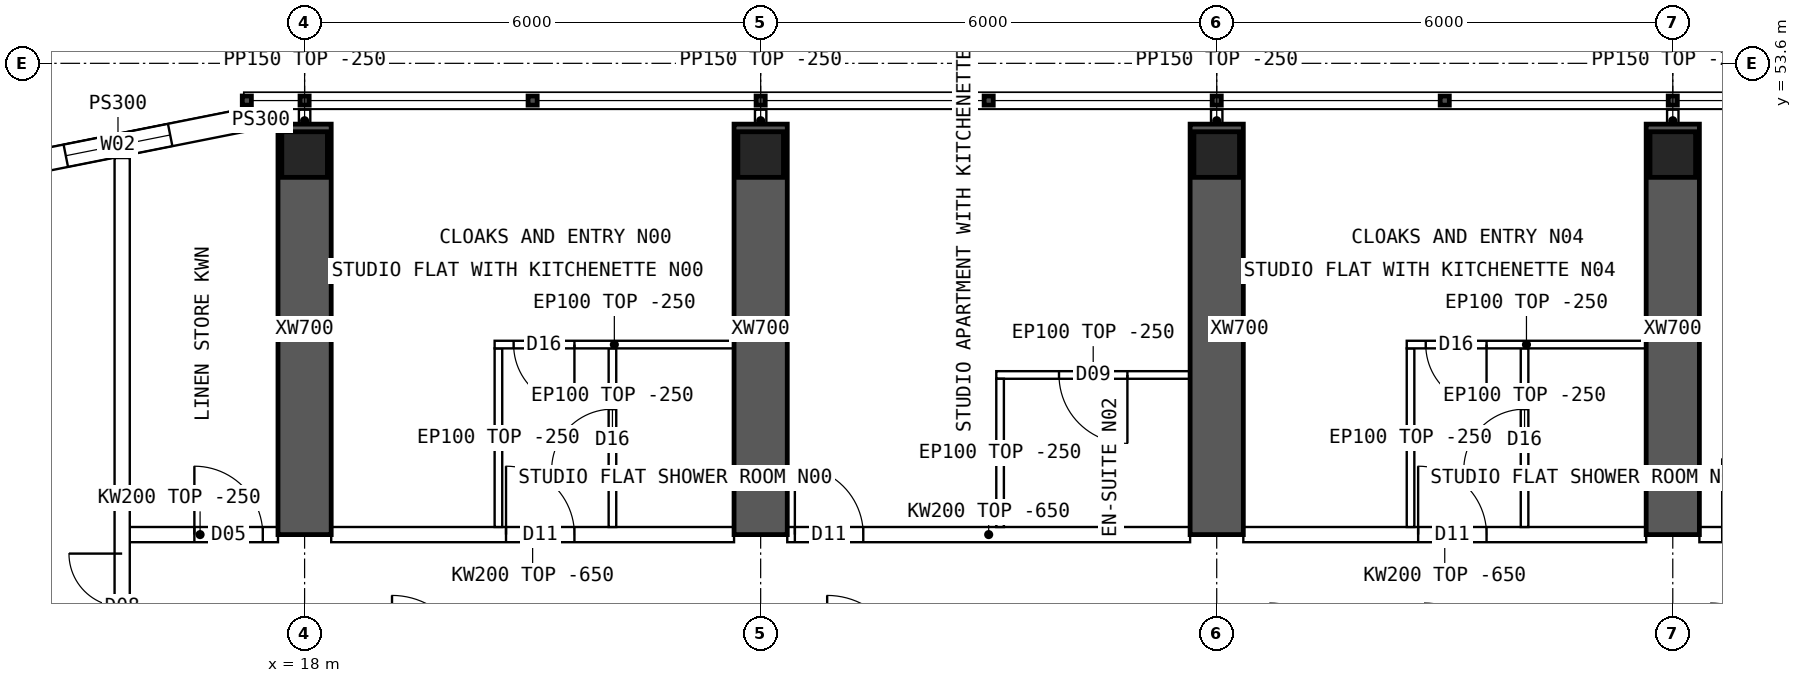
"""IFC4 building model, lengths in metres.
Left out: names, types, materials, properties, quantities, classifications, styles, units other than length and angle.
Written with IfcOpenShell. Run it as: python <this file> out.ifc"""

import sys

from ifc_helpers import new_model, si_unit, direction, frame, frame_2d, origin, origin_2d, place, context, subcontext, project, spatial, polyline, rectangle, hollow_rectangle, outline, extrude, element, fill, save


model = new_model("IFC4")
c1 = context("Model", 3, precision=1e-05, world=origin(), true_north=direction((0.0, 1.0)))
c2 = subcontext(c1, "Body", "Model", "MODEL_VIEW")
j1 = project(units=[si_unit("LENGTHUNIT", "METRE"), si_unit("PLANEANGLEUNIT", "RADIAN")], contexts=[c1])
p1 = place(None, origin())
s1 = spatial("IfcSite", under=j1, at=p1, CompositionType="ELEMENT")
p2 = place(p1, origin())
s2 = spatial("IfcBuilding", under=s1, at=p2, CompositionType="ELEMENT")
p3 = place(p2, frame((0.0, 0.0, 224.05)))
s3 = spatial("IfcBuildingStorey", under=s2, at=p3, CompositionType="ELEMENT", Elevation=224.05)
for number, where, z_axis, x_axis in (
    (1, (18.0, 52.4, 0.0), (0.0, 0.0, 1.0), (1.0, 0.0, 0.0)),
    (2, (24.0, 52.4, 0.0), (0.0, 0.0, 1.0), (1.0, 0.0, 0.0)),
    (3, (30.0, 52.4, 0.0), (0.0, 0.0, 1.0), (1.0, 0.0, 0.0)),
    (4, (36.0, 52.4, 0.0), (0.0, 0.0, 1.0), (1.0, 0.0, 0.0)),
):
    element("IfcColumn", number, at=place(p3, frame(where, z_axis=z_axis, x_axis=x_axis)), inside=s3, PredefinedType="COLUMN", context=c2, shape_type="SweptSolid", body=[
        extrude(hollow_rectangle(XDim=0.6, YDim=0.6, WallThickness=0.06, at=origin_2d()), origin(), (0.0, 0.0, 1.0), 3.75),
    ])
for number, where, z_axis, x_axis in (
    (5, (18.0, 47.4, 0.0), (0.0, 0.0, 1.0), (0.0, 1.0, 0.0)),
    (6, (24.0, 47.4, 0.0), (0.0, 0.0, 1.0), (0.0, 1.0, 0.0)),
    (7, (30.0, 47.4, 0.0), (0.0, 0.0, 1.0), (0.0, 1.0, 0.0)),
    (8, (36.0, 47.4, 0.0), (0.0, 0.0, 1.0), (0.0, 1.0, 0.0)),
):
    element("IfcWall", number, at=place(p3, frame(where, z_axis=z_axis, x_axis=x_axis)), inside=s3, PredefinedType="SHEAR", context=c2, shape_type="SweptSolid", body=[
        extrude(rectangle(XDim=5.4, YDim=0.7, at=frame_2d((2.7, 0.0))), origin(), (0.0, 0.0, 1.0), 3.75),
    ])
p4 = place(p3, frame((17.2, 52.85, 0.0), z_axis=(0.0, 0.0, 1.0), x_axis=(-0.98078325777, -0.195100490205, 0.0)))
e9 = element("IfcWall", 9, at=p4, inside=s3, PredefinedType="SOLIDWALL", context=c2, shape_type="SweptSolid", body=[
    extrude(outline(polyline([(-0.03, -0.15), (3.405, -0.15), (3.345, 0.15), (0.03, 0.15), (-0.03, -0.15)])), origin(), (0.0, 0.0, 1.0), 3.5),
])
p5 = place(p4, frame((0.988, 0.0, 0.9)))
e10 = element("IfcOpeningElement", 10, at=p5, cuts=e9, PredefinedType="OPENING", context=c2, shape_type="SweptSolid", body=[
    extrude(rectangle(XDim=1.4, YDim=1.8, at=frame_2d((0.7, 0.9))), frame((0.0, 0.16, 0.0), z_axis=(0.0, -1.0, 0.0), x_axis=(1.0, 0.0, 0.0)), (0.0, 0.0, 1.0), 0.32),
])
p6 = place(p3, frame((17.2, 52.85, 0.0), z_axis=(0.0, 0.0, 1.0), x_axis=(1.0, 0.0, 0.0)))
e11 = element("IfcWall", 11, at=p6, inside=s3, PredefinedType="SOLIDWALL", context=c2, shape_type="SweptSolid", body=[
    extrude(rectangle(XDim=0.45, YDim=0.3, at=frame_2d((0.225, 0.0))), origin(), (0.0, 0.0, 1.0), 3.5),
])
p7 = place(p3, frame((15.6, 47.4, 0.0), z_axis=(0.0, 0.0, 1.0), x_axis=(1.0, 0.0, 0.0)))
e12 = element("IfcWall", 12, at=p7, inside=s3, PredefinedType="SOLIDWALL", context=c2, shape_type="SweptSolid", body=[
    extrude(rectangle(XDim=2.05, YDim=0.2, at=frame_2d((1.025, 0.0))), origin(), (0.0, 0.0, 1.0), 3.5),
])
p8 = place(p7, frame((0.95, 0.0, 0.0)))
e13 = element("IfcOpeningElement", 13, at=p8, cuts=e12, PredefinedType="OPENING", context=c2, shape_type="SweptSolid", body=[
    extrude(rectangle(XDim=0.9, YDim=2.1, at=frame_2d((0.45, 1.05))), frame((0.0, 0.11, 0.0), z_axis=(0.0, -1.0, 0.0), x_axis=(1.0, 0.0, 0.0)), (0.0, 0.0, 1.0), 0.22),
])
p9 = place(p3, frame((18.35, 47.4, 0.0), z_axis=(0.0, 0.0, 1.0), x_axis=(1.0, 0.0, 0.0)))
e14 = element("IfcWall", 14, at=p9, inside=s3, PredefinedType="SOLIDWALL", context=c2, shape_type="SweptSolid", body=[
    extrude(outline(polyline([(0.0, 0.0), (5.3, 0.0), (5.3, 3.1), (0.0, 3.1), (0.0, 0.0)])), frame((0.0, 0.1, 0.0), z_axis=(0.0, -1.0, 0.0), x_axis=(1.0, 0.0, 0.0)), (0.0, 0.0, 1.0), 0.2),
])
p10 = place(p9, frame((2.3, 0.0, 0.0)))
e15 = element("IfcOpeningElement", 15, at=p10, cuts=e14, PredefinedType="OPENING", context=c2, shape_type="SweptSolid", body=[
    extrude(rectangle(XDim=0.9, YDim=2.1, at=frame_2d((0.45, 1.05))), frame((0.0, 0.11, 0.0), z_axis=(0.0, -1.0, 0.0), x_axis=(1.0, 0.0, 0.0)), (0.0, 0.0, 1.0), 0.22),
])
p11 = place(p3, frame((24.35, 47.4, 0.0), z_axis=(0.0, 0.0, 1.0), x_axis=(1.0, 0.0, 0.0)))
e16 = element("IfcWall", 16, at=p11, inside=s3, PredefinedType="SOLIDWALL", context=c2, shape_type="SweptSolid", body=[
    extrude(outline(polyline([(0.0, 0.0), (5.3, 0.0), (5.3, 3.1), (0.0, 3.1), (0.0, 0.0)])), frame((0.0, 0.1, 0.0), z_axis=(0.0, -1.0, 0.0), x_axis=(1.0, 0.0, 0.0)), (0.0, 0.0, 1.0), 0.2),
])
p12 = place(p11, frame((0.1, 0.0, 0.0)))
e17 = element("IfcOpeningElement", 17, at=p12, cuts=e16, PredefinedType="OPENING", context=c2, shape_type="SweptSolid", body=[
    extrude(rectangle(XDim=0.9, YDim=2.1, at=frame_2d((0.45, 1.05))), frame((0.0, 0.11, 0.0), z_axis=(0.0, -1.0, 0.0), x_axis=(1.0, 0.0, 0.0)), (0.0, 0.0, 1.0), 0.22),
])
p13 = place(p3, frame((30.35, 47.4, 0.0), z_axis=(0.0, 0.0, 1.0), x_axis=(1.0, 0.0, 0.0)))
e18 = element("IfcWall", 18, at=p13, inside=s3, PredefinedType="SOLIDWALL", context=c2, shape_type="SweptSolid", body=[
    extrude(outline(polyline([(0.0, 0.0), (5.3, 0.0), (5.3, 3.1), (0.0, 3.1), (0.0, 0.0)])), frame((0.0, 0.1, 0.0), z_axis=(0.0, -1.0, 0.0), x_axis=(1.0, 0.0, 0.0)), (0.0, 0.0, 1.0), 0.2),
])
p14 = place(p13, frame((2.3, 0.0, 0.0)))
e19 = element("IfcOpeningElement", 19, at=p14, cuts=e18, PredefinedType="OPENING", context=c2, shape_type="SweptSolid", body=[
    extrude(rectangle(XDim=0.9, YDim=2.1, at=frame_2d((0.45, 1.05))), frame((0.0, 0.11, 0.0), z_axis=(0.0, -1.0, 0.0), x_axis=(1.0, 0.0, 0.0)), (0.0, 0.0, 1.0), 0.22),
])
p15 = place(p3, frame((36.35, 47.4, 0.0), z_axis=(0.0, 0.0, 1.0), x_axis=(1.0, 0.0, 0.0)))
e20 = element("IfcWall", 20, at=p15, inside=s3, PredefinedType="SOLIDWALL", context=c2, shape_type="SweptSolid", body=[
    extrude(outline(polyline([(0.0, 0.0), (5.3, 0.0), (5.3, 3.1), (0.0, 3.1), (0.0, 0.0)])), frame((0.0, 0.1, 0.0), z_axis=(0.0, -1.0, 0.0), x_axis=(1.0, 0.0, 0.0)), (0.0, 0.0, 1.0), 0.2),
])
p16 = place(p15, frame((0.3, 0.0, 0.0)))
e21 = element("IfcOpeningElement", 21, at=p16, cuts=e20, PredefinedType="OPENING", context=c2, shape_type="SweptSolid", body=[
    extrude(rectangle(XDim=1.0, YDim=2.1, at=frame_2d((0.5, 1.05))), frame((0.0, 0.11, 0.0), z_axis=(0.0, -1.0, 0.0), x_axis=(1.0, 0.0, 0.0)), (0.0, 0.0, 1.0), 0.22),
])
p17 = place(p3, frame((20.5, 49.9, 0.0), z_axis=(0.0, 0.0, 1.0), x_axis=(1.0, 0.0, 0.0)))
e22 = element("IfcWall", 22, at=p17, inside=s3, PredefinedType="PARTITIONING", context=c2, shape_type="SweptSolid", body=[
    extrude(rectangle(XDim=3.15, YDim=0.1, at=frame_2d((1.575, 0.0))), origin(), (0.0, 0.0, 1.0), 3.5),
])
p18 = place(p17, frame((0.25, 0.0, 0.0)))
e23 = element("IfcOpeningElement", 23, at=p18, cuts=e22, PredefinedType="OPENING", context=c2, shape_type="SweptSolid", body=[
    extrude(rectangle(XDim=0.8, YDim=2.1, at=frame_2d((0.4, 1.05))), frame((0.0, 0.06, 0.0), z_axis=(0.0, -1.0, 0.0), x_axis=(1.0, 0.0, 0.0)), (0.0, 0.0, 1.0), 0.12),
])
p19 = place(p3, frame((20.55, 49.85, 0.0), z_axis=(0.0, 0.0, 1.0), x_axis=(0.0, -1.0, 0.0)))
e24 = element("IfcWall", 24, at=p19, inside=s3, PredefinedType="PARTITIONING", context=c2, shape_type="SweptSolid", body=[
    extrude(outline(polyline([(0.0, 0.0), (2.35, 0.0), (2.35, 3.1), (2.302, 3.1), (2.3, 3.5), (0.0, 3.5), (0.0, 0.0)])), frame((0.0, 0.05, 0.0), z_axis=(0.0, -1.0, 0.0), x_axis=(1.0, 0.0, 0.0)), (0.0, 0.0, 1.0), 0.1),
])
p20 = place(p3, frame((22.05, 49.85, 0.0), z_axis=(0.0, 0.0, 1.0), x_axis=(0.0, -1.0, 0.0)))
e25 = element("IfcWall", 25, at=p20, inside=s3, PredefinedType="PARTITIONING", context=c2, shape_type="SweptSolid", body=[
    extrude(outline(polyline([(0.0, 0.0), (2.35, 0.0), (2.35, 3.1), (2.302, 3.1), (2.3, 3.5), (0.0, 3.5), (0.0, 0.0)])), frame((0.0, 0.05, 0.0), z_axis=(0.0, -1.0, 0.0), x_axis=(1.0, 0.0, 0.0)), (0.0, 0.0, 1.0), 0.1),
])
p21 = place(p20, frame((0.8, 0.0, 0.0)))
e26 = element("IfcOpeningElement", 26, at=p21, cuts=e25, PredefinedType="OPENING", context=c2, shape_type="SweptSolid", body=[
    extrude(rectangle(XDim=0.8, YDim=2.1, at=frame_2d((0.4, 1.05))), frame((0.0, 0.06, 0.0), z_axis=(0.0, -1.0, 0.0), x_axis=(1.0, 0.0, 0.0)), (0.0, 0.0, 1.0), 0.12),
])
p22 = place(p3, frame((27.1, 49.5, 0.0), z_axis=(0.0, 0.0, 1.0), x_axis=(1.0, 0.0, 0.0)))
e27 = element("IfcWall", 27, at=p22, inside=s3, PredefinedType="PARTITIONING", context=c2, shape_type="SweptSolid", body=[
    extrude(rectangle(XDim=2.55, YDim=0.1, at=frame_2d((1.275, 0.0))), origin(), (0.0, 0.0, 1.0), 3.5),
])
p23 = place(p22, frame((0.825, 0.0, 0.0)))
e28 = element("IfcOpeningElement", 28, at=p23, cuts=e27, PredefinedType="OPENING", context=c2, shape_type="SweptSolid", body=[
    extrude(rectangle(XDim=0.9, YDim=2.1, at=frame_2d((0.45, 1.05))), frame((0.0, 0.06, 0.0), z_axis=(0.0, -1.0, 0.0), x_axis=(1.0, 0.0, 0.0)), (0.0, 0.0, 1.0), 0.12),
])
p24 = place(p3, frame((27.15, 49.45, 0.0), z_axis=(0.0, 0.0, 1.0), x_axis=(0.0, -1.0, 0.0)))
e29 = element("IfcWall", 29, at=p24, inside=s3, PredefinedType="PARTITIONING", context=c2, shape_type="SweptSolid", body=[
    extrude(outline(polyline([(0.0, 0.0), (1.95, 0.0), (1.95, 3.1), (1.902, 3.1), (1.9, 3.5), (0.0, 3.5), (0.0, 0.0)])), frame((0.0, 0.05, 0.0), z_axis=(0.0, -1.0, 0.0), x_axis=(1.0, 0.0, 0.0)), (0.0, 0.0, 1.0), 0.1),
])
p25 = place(p3, frame((32.5, 49.9, 0.0), z_axis=(0.0, 0.0, 1.0), x_axis=(1.0, 0.0, 0.0)))
e30 = element("IfcWall", 30, at=p25, inside=s3, PredefinedType="PARTITIONING", context=c2, shape_type="SweptSolid", body=[
    extrude(rectangle(XDim=3.15, YDim=0.1, at=frame_2d((1.575, 0.0))), origin(), (0.0, 0.0, 1.0), 3.5),
])
p26 = place(p25, frame((0.25, 0.0, 0.0)))
e31 = element("IfcOpeningElement", 31, at=p26, cuts=e30, PredefinedType="OPENING", context=c2, shape_type="SweptSolid", body=[
    extrude(rectangle(XDim=0.8, YDim=2.1, at=frame_2d((0.4, 1.05))), frame((0.0, 0.06, 0.0), z_axis=(0.0, -1.0, 0.0), x_axis=(1.0, 0.0, 0.0)), (0.0, 0.0, 1.0), 0.12),
])
p27 = place(p3, frame((32.55, 49.85, 0.0), z_axis=(0.0, 0.0, 1.0), x_axis=(0.0, -1.0, 0.0)))
e32 = element("IfcWall", 32, at=p27, inside=s3, PredefinedType="PARTITIONING", context=c2, shape_type="SweptSolid", body=[
    extrude(outline(polyline([(0.0, 0.0), (2.35, 0.0), (2.35, 3.1), (2.302, 3.1), (2.3, 3.5), (0.0, 3.5), (0.0, 0.0)])), frame((0.0, 0.05, 0.0), z_axis=(0.0, -1.0, 0.0), x_axis=(1.0, 0.0, 0.0)), (0.0, 0.0, 1.0), 0.1),
])
p28 = place(p3, frame((34.05, 49.85, 0.0), z_axis=(0.0, 0.0, 1.0), x_axis=(0.0, -1.0, 0.0)))
e33 = element("IfcWall", 33, at=p28, inside=s3, PredefinedType="PARTITIONING", context=c2, shape_type="SweptSolid", body=[
    extrude(outline(polyline([(0.0, 0.0), (2.35, 0.0), (2.35, 3.1), (2.302, 3.1), (2.3, 3.5), (0.0, 3.5), (0.0, 0.0)])), frame((0.0, 0.05, 0.0), z_axis=(0.0, -1.0, 0.0), x_axis=(1.0, 0.0, 0.0)), (0.0, 0.0, 1.0), 0.1),
])
p29 = place(p28, frame((0.8, 0.0, 0.0)))
e34 = element("IfcOpeningElement", 34, at=p29, cuts=e33, PredefinedType="OPENING", context=c2, shape_type="SweptSolid", body=[
    extrude(rectangle(XDim=0.8, YDim=2.1, at=frame_2d((0.4, 1.05))), frame((0.0, 0.06, 0.0), z_axis=(0.0, -1.0, 0.0), x_axis=(1.0, 0.0, 0.0)), (0.0, 0.0, 1.0), 0.12),
])
p30 = place(p3, frame((15.6, 11.646, 0.0), z_axis=(0.0, 0.0, 1.0), x_axis=(0.0, 1.0, 0.0)))
e35 = element("IfcWall", 35, at=p30, inside=s3, PredefinedType="SOLIDWALL", context=c2, shape_type="SweptSolid", body=[
    extrude(rectangle(XDim=40.708, YDim=0.2, at=frame_2d((20.354, 0.0))), origin(), (0.0, 0.0, 1.0), 3.5),
])
p31 = place(p30, frame((13.434, 0.0, 0.0)))
e36 = element("IfcOpeningElement", 36, at=p31, cuts=e35, PredefinedType="OPENING", context=c2, shape_type="SweptSolid", body=[
    extrude(rectangle(XDim=1.2, YDim=2.1, at=frame_2d((0.6, 1.05))), frame((0.0, 0.11, 0.0), z_axis=(0.0, -1.0, 0.0), x_axis=(1.0, 0.0, 0.0)), (0.0, 0.0, 1.0), 0.22),
])
p32 = place(p30, frame((26.074, 0.0, 0.0)))
e37 = element("IfcOpeningElement", 37, at=p32, cuts=e35, PredefinedType="OPENING", context=c2, shape_type="SweptSolid", body=[
    extrude(rectangle(XDim=1.2, YDim=2.1, at=frame_2d((0.6, 1.05))), frame((0.0, 0.11, 0.0), z_axis=(0.0, -1.0, 0.0), x_axis=(1.0, 0.0, 0.0)), (0.0, 0.0, 1.0), 0.22),
])
p33 = place(p30, frame((5.104, 0.0, 0.0)))
e38 = element("IfcOpeningElement", 38, at=p33, cuts=e35, PredefinedType="OPENING", context=c2, shape_type="SweptSolid", body=[
    extrude(rectangle(XDim=1.4, YDim=2.1, at=frame_2d((0.7, 1.05))), frame((0.0, 0.11, 0.0), z_axis=(0.0, -1.0, 0.0), x_axis=(1.0, 0.0, 0.0)), (0.0, 0.0, 1.0), 0.22),
])
p34 = place(p30, frame((34.104, 0.0, 0.0)))
e39 = element("IfcOpeningElement", 39, at=p34, cuts=e35, PredefinedType="OPENING", context=c2, shape_type="SweptSolid", body=[
    extrude(rectangle(XDim=1.4, YDim=2.1, at=frame_2d((0.7, 1.05))), frame((0.0, 0.11, 0.0), z_axis=(0.0, -1.0, 0.0), x_axis=(1.0, 0.0, 0.0)), (0.0, 0.0, 1.0), 0.22),
])
for number, where, z_axis, x_axis in (
    (40, (18.0, 52.7, 0.0), (0.0, 0.0, 1.0), (0.0, 1.0, 0.0)),
    (41, (24.0, 52.7, 0.0), (0.0, 0.0, 1.0), (0.0, 1.0, 0.0)),
    (42, (30.0, 52.7, 0.0), (0.0, 0.0, 1.0), (0.0, 1.0, 0.0)),
    (43, (36.0, 52.7, 0.0), (0.0, 0.0, 1.0), (0.0, 1.0, 0.0)),
):
    element("IfcWall", number, at=place(p3, frame(where, z_axis=z_axis, x_axis=x_axis)), inside=s3, PredefinedType="PARTITIONING", context=c2, shape_type="SweptSolid", body=[
        extrude(rectangle(XDim=0.29, YDim=0.15, at=frame_2d((0.145, 0.0))), origin(), (0.0, 0.0, 1.0), 3.5),
    ])
p35 = place(p5, origin())
e44 = element("IfcWindow", 44, at=p35, inside=s3, PartitioningType="SINGLE_PANEL", PredefinedType="WINDOW", context=c2, shape_type="SweptSolid", body=[
    extrude(rectangle(XDim=1.4, YDim=1.8, at=frame_2d((0.7, 0.9))), frame((0.0, 0.03, 0.0), z_axis=(0.0, -1.0, 0.0), x_axis=(1.0, 0.0, 0.0)), (0.0, 0.0, 1.0), 0.06),
])
fill(e10, e44)
p36 = place(p18, origin())
e45 = element("IfcDoor", 45, at=p36, inside=s3, OperationType="SINGLE_SWING_RIGHT", PredefinedType="DOOR", context=c2, shape_type="SweptSolid", body=[
    extrude(rectangle(XDim=0.8, YDim=2.1, at=frame_2d((0.4, 1.05))), frame((0.0, 0.025, 0.0), z_axis=(0.0, -1.0, 0.0), x_axis=(1.0, 0.0, 0.0)), (0.0, 0.0, 1.0), 0.05),
])
fill(e23, e45)
p37 = place(p21, origin())
e46 = element("IfcDoor", 46, at=p37, inside=s3, OperationType="SINGLE_SWING_RIGHT", PredefinedType="DOOR", context=c2, shape_type="SweptSolid", body=[
    extrude(rectangle(XDim=0.8, YDim=2.1, at=frame_2d((0.4, 1.05))), frame((0.0, 0.025, 0.0), z_axis=(0.0, -1.0, 0.0), x_axis=(1.0, 0.0, 0.0)), (0.0, 0.0, 1.0), 0.05),
])
fill(e26, e46)
p38 = place(p10, origin())
e47 = element("IfcDoor", 47, at=p38, inside=s3, OperationType="SINGLE_SWING_LEFT", PredefinedType="DOOR", context=c2, shape_type="SweptSolid", body=[
    extrude(rectangle(XDim=0.9, YDim=2.1, at=frame_2d((0.45, 1.05))), frame((0.0, 0.025, 0.0), z_axis=(0.0, -1.0, 0.0), x_axis=(1.0, 0.0, 0.0)), (0.0, 0.0, 1.0), 0.05),
])
fill(e15, e47)
p39 = place(p23, origin())
e48 = element("IfcDoor", 48, at=p39, inside=s3, OperationType="SINGLE_SWING_RIGHT", PredefinedType="DOOR", context=c2, shape_type="SweptSolid", body=[
    extrude(rectangle(XDim=0.9, YDim=2.1, at=frame_2d((0.45, 1.05))), frame((0.0, 0.025, 0.0), z_axis=(0.0, -1.0, 0.0), x_axis=(1.0, 0.0, 0.0)), (0.0, 0.0, 1.0), 0.05),
])
fill(e28, e48)
p40 = place(p12, origin())
e49 = element("IfcDoor", 49, at=p40, inside=s3, OperationType="SINGLE_SWING_LEFT", PredefinedType="DOOR", context=c2, shape_type="SweptSolid", body=[
    extrude(rectangle(XDim=0.9, YDim=2.1, at=frame_2d((0.45, 1.05))), frame((0.0, 0.025, 0.0), z_axis=(0.0, -1.0, 0.0), x_axis=(1.0, 0.0, 0.0)), (0.0, 0.0, 1.0), 0.05),
])
fill(e17, e49)
p41 = place(p26, origin())
e50 = element("IfcDoor", 50, at=p41, inside=s3, OperationType="SINGLE_SWING_RIGHT", PredefinedType="DOOR", context=c2, shape_type="SweptSolid", body=[
    extrude(rectangle(XDim=0.8, YDim=2.1, at=frame_2d((0.4, 1.05))), frame((0.0, 0.025, 0.0), z_axis=(0.0, -1.0, 0.0), x_axis=(1.0, 0.0, 0.0)), (0.0, 0.0, 1.0), 0.05),
])
fill(e31, e50)
p42 = place(p29, origin())
e51 = element("IfcDoor", 51, at=p42, inside=s3, OperationType="SINGLE_SWING_RIGHT", PredefinedType="DOOR", context=c2, shape_type="SweptSolid", body=[
    extrude(rectangle(XDim=0.8, YDim=2.1, at=frame_2d((0.4, 1.05))), frame((0.0, 0.025, 0.0), z_axis=(0.0, -1.0, 0.0), x_axis=(1.0, 0.0, 0.0)), (0.0, 0.0, 1.0), 0.05),
])
fill(e34, e51)
p43 = place(p14, origin())
e52 = element("IfcDoor", 52, at=p43, inside=s3, OperationType="SINGLE_SWING_LEFT", PredefinedType="DOOR", context=c2, shape_type="SweptSolid", body=[
    extrude(rectangle(XDim=0.9, YDim=2.1, at=frame_2d((0.45, 1.05))), frame((0.0, 0.025, 0.0), z_axis=(0.0, -1.0, 0.0), x_axis=(1.0, 0.0, 0.0)), (0.0, 0.0, 1.0), 0.05),
])
fill(e19, e52)
p44 = place(p34, origin())
e53 = element("IfcDoor", 53, at=p44, inside=s3, OperationType="DOUBLE_DOOR_SINGLE_SWING", PredefinedType="DOOR", context=c2, shape_type="SweptSolid", body=[
    extrude(rectangle(XDim=1.4, YDim=2.1, at=frame_2d((0.7, 1.05))), frame((0.0, 0.025, 0.0), z_axis=(0.0, -1.0, 0.0), x_axis=(1.0, 0.0, 0.0)), (0.0, 0.0, 1.0), 0.05),
])
fill(e39, e53)
p45 = place(p8, origin())
e54 = element("IfcDoor", 54, at=p45, inside=s3, OperationType="SINGLE_SWING_LEFT", PredefinedType="DOOR", context=c2, shape_type="SweptSolid", body=[
    extrude(rectangle(XDim=0.9, YDim=2.1, at=frame_2d((0.45, 1.05))), frame((0.0, 0.025, 0.0), z_axis=(0.0, -1.0, 0.0), x_axis=(1.0, 0.0, 0.0)), (0.0, 0.0, 1.0), 0.05),
])
fill(e13, e54)
save(model, sys.argv[1])
